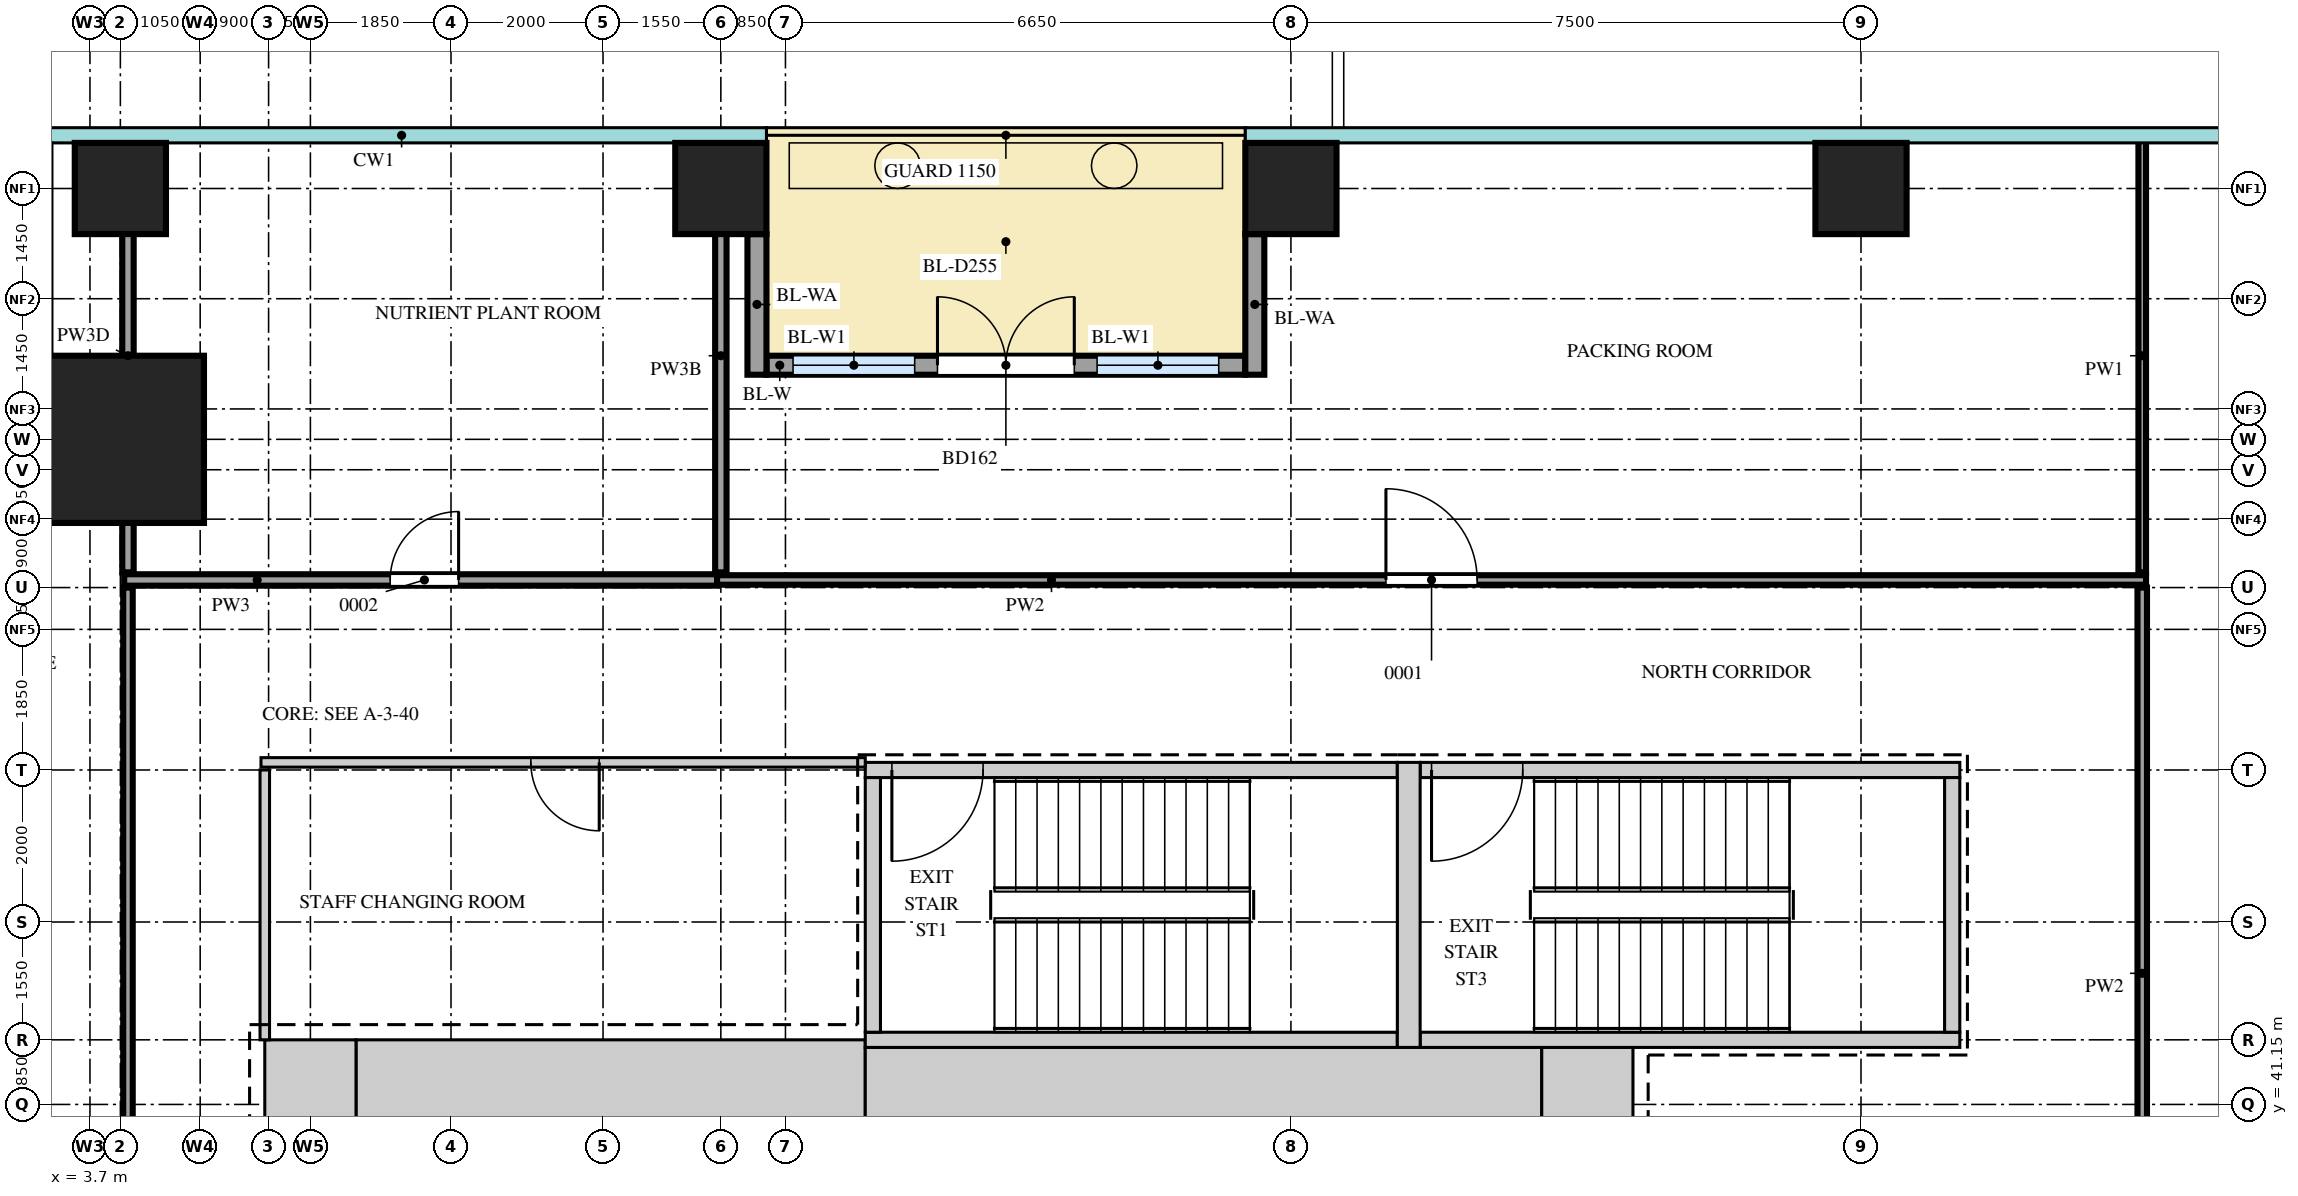
"""IFC4 building model, lengths in metres.
Left out: names, types, materials, properties, quantities, classifications, styles, units other than length and angle.
Written with IfcOpenShell. Run it as: python <this file> out.ifc"""

import sys

from ifc_helpers import new_model, si_unit, direction, frame, frame_2d, origin, origin_2d, place, context, subcontext, project, spatial, rectangle, extrude, source, transform, mapped, element, fill, save


model = new_model("IFC4")
c1 = context("Model", 3, precision=1e-05, world=origin(), true_north=direction((0.0, 1.0)))
c2 = subcontext(c1, "Body", "Model", "MODEL_VIEW")
j1 = project(units=[si_unit("LENGTHUNIT", "METRE"), si_unit("PLANEANGLEUNIT", "RADIAN")], contexts=[c1])
p1 = place(None, origin())
s1 = spatial("IfcSite", under=j1, at=p1, CompositionType="ELEMENT")
p2 = place(p1, origin())
s2 = spatial("IfcBuilding", under=s1, at=p2, CompositionType="ELEMENT")
p3 = place(p2, frame((0.0, 0.0, 78.0)))
s3 = spatial("IfcBuildingStorey", under=s2, at=p3, CompositionType="ELEMENT", Elevation=78.0)
m1 = source(origin(), c2, "Body", "SweptSolid", [
    extrude(rectangle(XDim=6.7, YDim=1.2, at=frame_2d((3.35, 0.0))), origin(), (0.0, 0.0, 1.0), 4.2),
])
p4 = place(p3, frame((7.2, 41.4, 0.0), z_axis=(0.0, 0.0, 1.0), x_axis=(1.0, 0.0, 0.0)))
e1 = element("IfcWall", 1, at=p4, inside=s3, PredefinedType="SHEAR", context=c2, shape_type="MappedRepresentation", body=[
    mapped(m1, transform((0.0, 0.0, 0.0))),
])
m2 = source(origin(), c2, "Body", "SweptSolid", [
    extrude(rectangle(XDim=8.9, YDim=1.1, at=frame_2d((4.45, 0.0))), origin(), (0.0, 0.0, 1.0), 4.2),
])
p5 = place(p3, frame((13.9, 41.35, 0.0), z_axis=(0.0, 0.0, 1.0), x_axis=(1.0, 0.0, 0.0)))
e2 = element("IfcWall", 2, at=p5, inside=s3, PredefinedType="SHEAR", context=c2, shape_type="MappedRepresentation", body=[
    mapped(m2, transform((0.0, 0.0, 0.0))),
])
m3 = source(origin(), c2, "Body", "SweptSolid", [
    extrude(rectangle(XDim=1.2, YDim=1.1, at=frame_2d((0.6, 0.0))), origin(), (0.0, 0.0, 1.0), 4.2),
])
p6 = place(p3, frame((22.8, 41.35, 0.0), z_axis=(0.0, 0.0, 1.0), x_axis=(1.0, 0.0, 0.0)))
e3 = element("IfcWall", 3, at=p6, inside=s3, PredefinedType="SHEAR", context=c2, shape_type="MappedRepresentation", body=[
    mapped(m3, transform((0.0, 0.0, 0.0))),
])
m4 = source(origin(), c2, "Body", "SweptSolid", [
    extrude(rectangle(XDim=1.2, YDim=1.2, at=frame_2d((0.6, 0.0))), origin(), (0.0, 0.0, 1.0), 4.2),
])
p7 = place(p3, frame((6.0, 41.4, 0.0), z_axis=(0.0, 0.0, 1.0), x_axis=(1.0, 0.0, 0.0)))
e4 = element("IfcWall", 4, at=p7, inside=s3, PredefinedType="SHEAR", context=c2, shape_type="MappedRepresentation", body=[
    mapped(m4, transform((0.0, 0.0, 0.0))),
])
m5 = source(origin(), c2, "Body", "SweptSolid", [
    extrude(rectangle(XDim=7.0, YDim=0.2, at=frame_2d((3.5, 0.0))), origin(), (0.0, 0.0, 1.0), 4.2),
])
p8 = place(p3, frame((13.9, 45.55, 0.0), z_axis=(0.0, 0.0, 1.0), x_axis=(1.0, 0.0, 0.0)))
e5 = element("IfcWall", 5, at=p8, inside=s3, PredefinedType="SHEAR", context=c2, shape_type="MappedRepresentation", body=[
    mapped(m5, transform((0.0, 0.0, 0.0))),
])
m6 = source(origin(), c2, "Body", "SweptSolid", [
    extrude(rectangle(XDim=1.2, YDim=2.1, at=frame_2d((0.6, 1.05))), frame((0.0, 0.11, 0.0), z_axis=(0.0, -1.0, 0.0), x_axis=(1.0, 0.0, 0.0)), (0.0, 0.0, 1.0), 0.22),
])
p9 = place(p8, frame((0.35, 0.0, 0.0)))
e6 = element("IfcOpeningElement", 6, at=p9, cuts=e5, PredefinedType="OPENING", context=c2, shape_type="MappedRepresentation", body=[
    mapped(m6, transform((0.0, 0.0, 0.0))),
])
p10 = place(p3, frame((13.9, 42.0, 0.0), z_axis=(0.0, 0.0, 1.0), x_axis=(1.0, 0.0, 0.0)))
e7 = element("IfcWall", 7, at=p10, inside=s3, PredefinedType="SHEAR", context=c2, shape_type="MappedRepresentation", body=[
    mapped(m5, transform((0.0, 0.0, 0.0))),
])
m7 = source(origin(), c2, "Body", "SweptSolid", [
    extrude(rectangle(XDim=7.1, YDim=0.2, at=frame_2d((3.55, 0.0))), origin(), (0.0, 0.0, 1.0), 4.2),
])
p11 = place(p3, frame((21.2, 45.55, 0.0), z_axis=(0.0, 0.0, 1.0), x_axis=(1.0, 0.0, 0.0)))
e8 = element("IfcWall", 8, at=p11, inside=s3, PredefinedType="SHEAR", context=c2, shape_type="MappedRepresentation", body=[
    mapped(m7, transform((0.0, 0.0, 0.0))),
])
p12 = place(p11, frame((0.15, 0.0, 0.0)))
e9 = element("IfcOpeningElement", 9, at=p12, cuts=e8, PredefinedType="OPENING", context=c2, shape_type="MappedRepresentation", body=[
    mapped(m6, transform((0.0, 0.0, 0.0))),
])
p13 = place(p3, frame((21.2, 42.0, 0.0), z_axis=(0.0, 0.0, 1.0), x_axis=(1.0, 0.0, 0.0)))
e10 = element("IfcWall", 10, at=p13, inside=s3, PredefinedType="SHEAR", context=c2, shape_type="MappedRepresentation", body=[
    mapped(m7, transform((0.0, 0.0, 0.0))),
])
m8 = source(origin(), c2, "Body", "SweptSolid", [
    extrude(rectangle(XDim=3.75, YDim=0.3, at=frame_2d((1.875, 0.0))), origin(), (0.0, 0.0, 1.0), 4.2),
])
p14 = place(p3, frame((21.05, 41.9, 0.0), z_axis=(0.0, 0.0, 1.0), x_axis=(0.0, 1.0, 0.0)))
e11 = element("IfcWall", 11, at=p14, inside=s3, PredefinedType="SHEAR", context=c2, shape_type="MappedRepresentation", body=[
    mapped(m8, transform((0.0, 0.0, 0.0))),
])
m9 = source(origin(), c2, "Body", "SweptSolid", [
    extrude(rectangle(XDim=3.35, YDim=0.2, at=frame_2d((1.675, 0.0))), origin(), (0.0, 0.0, 1.0), 4.2),
])
for number, where, z_axis, x_axis in (
    (12, (14.0, 42.1, 0.0), (0.0, 0.0, 1.0), (0.0, 1.0, 0.0)),
    (13, (28.2, 42.1, 0.0), (0.0, 0.0, 1.0), (0.0, 1.0, 0.0)),
):
    element("IfcWall", number, at=place(p3, frame(where, z_axis=z_axis, x_axis=x_axis)), inside=s3, PredefinedType="SHEAR", context=c2, shape_type="MappedRepresentation", body=[
        mapped(m9, transform((0.0, 0.0, 0.0))),
    ])
m10 = source(origin(), c2, "Body", "SweptSolid", [
    extrude(rectangle(XDim=2.2, YDim=2.2, at=origin_2d()), origin(), (0.0, 0.0, 1.0), 4.5),
])
p15 = place(p3, frame((4.1, 49.9, 0.0), z_axis=(0.0, 0.0, 1.0), x_axis=(1.0, 0.0, 0.0)))
e14 = element("IfcColumn", 14, at=p15, inside=s3, PredefinedType="COLUMN", context=c2, shape_type="MappedRepresentation", body=[
    mapped(m10, transform((0.0, 0.0, 0.0))),
])
m11 = source(origin(), c2, "Body", "SweptSolid", [
    extrude(rectangle(XDim=1.2, YDim=1.2, at=origin_2d()), origin(), (0.0, 0.0, 1.0), 4.2),
])
for number, where, z_axis, x_axis in (
    (15, (4.1, 53.2, 0.0), (0.0, 0.0, 1.0), (1.0, 0.0, 0.0)),
    (16, (12.0, 53.2, 0.0), (0.0, 0.0, 1.0), (1.0, 0.0, 0.0)),
    (17, (19.5, 53.2, 0.0), (0.0, 0.0, 1.0), (1.0, 0.0, 0.0)),
    (18, (27.0, 53.2, 0.0), (0.0, 0.0, 1.0), (1.0, 0.0, 0.0)),
):
    element("IfcColumn", number, at=place(p3, frame(where, z_axis=z_axis, x_axis=x_axis)), inside=s3, PredefinedType="COLUMN", context=c2, shape_type="MappedRepresentation", body=[
        mapped(m11, transform((0.0, 0.0, 0.0))),
    ])
m12 = source(origin(), c2, "Body", "SweptSolid", [
    extrude(rectangle(XDim=6.3, YDim=0.25, at=frame_2d((3.15, 0.0))), origin(), (0.0, 0.0, 1.0), 4.2),
])
p16 = place(p3, frame((12.6, 50.875, 0.0), z_axis=(0.0, 0.0, 1.0), x_axis=(1.0, 0.0, 0.0)))
e19 = element("IfcWall", 19, at=p16, inside=s3, PredefinedType="SOLIDWALL", context=c2, shape_type="MappedRepresentation", body=[
    mapped(m12, transform((0.0, 0.0, 0.0))),
])
m13 = source(origin(), c2, "Body", "SweptSolid", [
    extrude(rectangle(XDim=1.6, YDim=2.4, at=frame_2d((0.8, 1.2))), frame((0.0, 0.135, 0.0), z_axis=(0.0, -1.0, 0.0), x_axis=(1.0, 0.0, 0.0)), (0.0, 0.0, 1.0), 0.27),
])
p17 = place(p16, frame((0.35, 0.0, 0.0)))
e20 = element("IfcOpeningElement", 20, at=p17, cuts=e19, PredefinedType="OPENING", context=c2, shape_type="MappedRepresentation", body=[
    mapped(m13, transform((0.0, 0.0, 0.0))),
])
p18 = place(p16, frame((4.35, 0.0, 0.0)))
e21 = element("IfcOpeningElement", 21, at=p18, cuts=e19, PredefinedType="OPENING", context=c2, shape_type="MappedRepresentation", body=[
    mapped(m13, transform((0.0, 0.0, 0.0))),
])
m14 = source(origin(), c2, "Body", "SweptSolid", [
    extrude(rectangle(XDim=1.8, YDim=2.4, at=frame_2d((0.9, 1.2))), frame((0.0, 0.135, 0.0), z_axis=(0.0, -1.0, 0.0), x_axis=(1.0, 0.0, 0.0)), (0.0, 0.0, 1.0), 0.27),
])
p19 = place(p16, frame((2.25, 0.0, 0.0)))
e22 = element("IfcOpeningElement", 22, at=p19, cuts=e19, PredefinedType="OPENING", context=c2, shape_type="MappedRepresentation", body=[
    mapped(m14, transform((0.0, 0.0, 0.0))),
])
m15 = source(origin(), c2, "Body", "SweptSolid", [
    extrude(rectangle(XDim=1.85, YDim=0.25, at=frame_2d((0.925, 0.0))), origin(), (0.0, 0.0, 1.0), 3.9),
])
for number, where, z_axis, x_axis in (
    (23, (12.475, 52.6, 0.0), (0.0, 0.0, 1.0), (0.0, -1.0, 0.0)),
    (24, (19.025, 52.6, 0.0), (0.0, 0.0, 1.0), (0.0, -1.0, 0.0)),
):
    element("IfcWall", number, at=place(p3, frame(where, z_axis=z_axis, x_axis=x_axis)), inside=s3, PredefinedType="SOLIDWALL", context=c2, shape_type="MappedRepresentation", body=[
        mapped(m15, transform((0.0, 0.0, 0.0))),
    ])
m16 = source(origin(), c2, "Body", "SweptSolid", [
    extrude(rectangle(XDim=41.8, YDim=0.125, at=frame_2d((20.9, 0.0))), origin(), (0.0, 0.0, 1.0), 4.3),
])
p20 = place(p3, frame((4.2, 6.15, 0.0), z_axis=(0.0, 0.0, 1.0), x_axis=(0.0, 1.0, 0.0)))
e25 = element("IfcWall", 25, at=p20, inside=s3, PredefinedType="PARTITIONING", context=c2, shape_type="MappedRepresentation", body=[
    mapped(m16, transform((0.0, 0.0, 0.0))),
])
m17 = source(origin(), c2, "Body", "SweptSolid", [
    extrude(rectangle(XDim=1.2, YDim=2.1, at=frame_2d((0.6, 1.05))), frame((0.0, 0.073, 0.0), z_axis=(0.0, -1.0, 0.0), x_axis=(1.0, 0.0, 0.0)), (0.0, 0.0, 1.0), 0.145),
])
p21 = place(p20, frame((3.45, 0.0, 0.0)))
e26 = element("IfcOpeningElement", 26, at=p21, cuts=e25, PredefinedType="OPENING", context=c2, shape_type="MappedRepresentation", body=[
    mapped(m17, transform((0.0, 0.0, 0.0))),
])
m18 = source(origin(), c2, "Body", "SweptSolid", [
    extrude(rectangle(XDim=0.9, YDim=2.1, at=frame_2d((0.45, 1.05))), frame((0.0, 0.073, 0.0), z_axis=(0.0, -1.0, 0.0), x_axis=(1.0, 0.0, 0.0)), (0.0, 0.0, 1.0), 0.145),
])
p22 = place(p20, frame((13.25, 0.0, 0.0)))
e27 = element("IfcOpeningElement", 27, at=p22, cuts=e25, PredefinedType="OPENING", context=c2, shape_type="MappedRepresentation", body=[
    mapped(m18, transform((0.0, 0.0, 0.0))),
])
p23 = place(p20, frame((30.35, 0.0, 0.0)))
e28 = element("IfcOpeningElement", 28, at=p23, cuts=e25, PredefinedType="OPENING", context=c2, shape_type="MappedRepresentation", body=[
    mapped(m18, transform((0.0, 0.0, 0.0))),
])
m19 = source(origin(), c2, "Body", "SweptSolid", [
    extrude(rectangle(XDim=10.15, YDim=0.125, at=frame_2d((5.075, 0.0))), origin(), (0.0, 0.0, 1.0), 4.3),
])
p24 = place(p3, frame((30.7, 37.8, 0.0), z_axis=(0.0, 0.0, 1.0), x_axis=(0.0, 1.0, 0.0)))
e29 = element("IfcWall", 29, at=p24, inside=s3, PredefinedType="PARTITIONING", context=c2, shape_type="MappedRepresentation", body=[
    mapped(m19, transform((0.0, 0.0, 0.0))),
])
m20 = source(origin(), c2, "Body", "SweptSolid", [
    extrude(rectangle(XDim=3.55, YDim=0.125, at=frame_2d((1.775, 0.0))), origin(), (0.0, 0.0, 1.0), 4.3),
])
p25 = place(p3, frame((6.0, 42.0, 0.0), z_axis=(0.0, 0.0, 1.0), x_axis=(0.0, 1.0, 0.0)))
e30 = element("IfcWall", 30, at=p25, inside=s3, PredefinedType="PARTITIONING", context=c2, shape_type="MappedRepresentation", body=[
    mapped(m20, transform((0.0, 0.0, 0.0))),
])
m21 = source(origin(), c2, "Body", "SweptSolid", [
    extrude(rectangle(XDim=7.95, YDim=0.125, at=frame_2d((3.975, 0.0))), origin(), (0.0, 0.0, 1.0), 4.3),
])
p26 = place(p3, frame((5.95, 45.65, 0.0), z_axis=(0.0, 0.0, 1.0), x_axis=(1.0, 0.0, 0.0)))
e31 = element("IfcWall", 31, at=p26, inside=s3, PredefinedType="PARTITIONING", context=c2, shape_type="MappedRepresentation", body=[
    mapped(m21, transform((0.0, 0.0, 0.0))),
])
p27 = place(p26, frame((3.55, 0.0, 0.0)))
e32 = element("IfcOpeningElement", 32, at=p27, cuts=e31, PredefinedType="OPENING", context=c2, shape_type="MappedRepresentation", body=[
    mapped(m18, transform((0.0, 0.0, 0.0))),
])
m22 = source(origin(), c2, "Body", "SweptSolid", [
    extrude(rectangle(XDim=7.8, YDim=0.15, at=frame_2d((3.9, 0.0))), origin(), (0.0, 0.0, 1.0), 4.3),
])
p28 = place(p3, frame((4.15, 48.05, 0.0), z_axis=(0.0, 0.0, 1.0), x_axis=(1.0, 0.0, 0.0)))
e33 = element("IfcWall", 33, at=p28, inside=s3, PredefinedType="PARTITIONING", context=c2, shape_type="MappedRepresentation", body=[
    mapped(m22, transform((0.0, 0.0, 0.0))),
])
m23 = source(origin(), c2, "Body", "SweptSolid", [
    extrude(rectangle(XDim=0.9, YDim=2.1, at=frame_2d((0.45, 1.05))), frame((0.0, 0.085, 0.0), z_axis=(0.0, -1.0, 0.0), x_axis=(1.0, 0.0, 0.0)), (0.0, 0.0, 1.0), 0.17),
])
p29 = place(p28, frame((3.5, 0.0, 0.0)))
e34 = element("IfcOpeningElement", 34, at=p29, cuts=e33, PredefinedType="OPENING", context=c2, shape_type="MappedRepresentation", body=[
    mapped(m23, transform((0.0, 0.0, 0.0))),
])
m24 = source(origin(), c2, "Body", "SweptSolid", [
    extrude(rectangle(XDim=18.8, YDim=0.125, at=frame_2d((9.4, 0.0))), origin(), (0.0, 0.0, 1.0), 4.3),
])
p30 = place(p3, frame((11.95, 48.05, 0.0), z_axis=(0.0, 0.0, 1.0), x_axis=(1.0, 0.0, 0.0)))
e35 = element("IfcWall", 35, at=p30, inside=s3, PredefinedType="PARTITIONING", context=c2, shape_type="MappedRepresentation", body=[
    mapped(m24, transform((0.0, 0.0, 0.0))),
])
p31 = place(p30, frame((8.8, 0.0, 0.0)))
e36 = element("IfcOpeningElement", 36, at=p31, cuts=e35, PredefinedType="OPENING", context=c2, shape_type="MappedRepresentation", body=[
    mapped(m17, transform((0.0, 0.0, 0.0))),
])
m25 = source(origin(), c2, "Body", "SweptSolid", [
    extrude(rectangle(XDim=5.7, YDim=0.15, at=frame_2d((2.85, 0.0))), origin(), (0.0, 0.0, 1.0), 3.6),
])
p32 = place(p3, frame((4.2, 48.15, 0.0), z_axis=(0.0, 0.0, 1.0), x_axis=(0.0, 1.0, 0.0)))
e37 = element("IfcWall", 37, at=p32, inside=s3, PredefinedType="PARTITIONING", context=c2, shape_type="MappedRepresentation", body=[
    mapped(m25, transform((0.0, 0.0, 0.0))),
])
m26 = source(origin(), c2, "Body", "SweptSolid", [
    extrude(rectangle(XDim=5.7, YDim=0.15, at=frame_2d((2.85, 0.0))), origin(), (0.0, 0.0, 1.0), 3.7),
])
p33 = place(p3, frame((12.0, 48.15, 0.0), z_axis=(0.0, 0.0, 1.0), x_axis=(0.0, 1.0, 0.0)))
e38 = element("IfcWall", 38, at=p33, inside=s3, PredefinedType="PARTITIONING", context=c2, shape_type="MappedRepresentation", body=[
    mapped(m26, transform((0.0, 0.0, 0.0))),
])
m27 = source(origin(), c2, "Body", "SweptSolid", [
    extrude(rectangle(XDim=5.7, YDim=0.1, at=frame_2d((2.85, 0.0))), origin(), (0.0, 0.0, 1.0), 4.3),
])
p34 = place(p3, frame((30.7, 48.15, 0.0), z_axis=(0.0, 0.0, 1.0), x_axis=(0.0, 1.0, 0.0)))
e39 = element("IfcWall", 39, at=p34, inside=s3, PredefinedType="PARTITIONING", context=c2, shape_type="MappedRepresentation", body=[
    mapped(m27, transform((0.0, 0.0, 0.0))),
])
m28 = source(origin(), c2, "Body", "SweptSolid", [
    extrude(rectangle(XDim=1.6, YDim=2.4, at=frame_2d((0.8, 1.2))), frame((0.0, 0.03, 0.0), z_axis=(0.0, -1.0, 0.0), x_axis=(1.0, 0.0, 0.0)), (0.0, 0.0, 1.0), 0.06),
])
p35 = place(p17, origin())
e40 = element("IfcWindow", 40, at=p35, inside=s3, PartitioningType="SINGLE_PANEL", PredefinedType="WINDOW", context=c2, shape_type="MappedRepresentation", body=[
    mapped(m28, transform((0.0, 0.0, 0.0))),
])
fill(e20, e40)
p36 = place(p18, origin())
e41 = element("IfcWindow", 41, at=p36, inside=s3, PartitioningType="SINGLE_PANEL", PredefinedType="WINDOW", context=c2, shape_type="MappedRepresentation", body=[
    mapped(m28, transform((0.0, 0.0, 0.0))),
])
fill(e21, e41)
m29 = source(origin(), c2, "Body", "SweptSolid", [
    extrude(rectangle(XDim=1.8, YDim=2.4, at=frame_2d((0.9, 1.2))), frame((0.0, 0.025, 0.0), z_axis=(0.0, -1.0, 0.0), x_axis=(1.0, 0.0, 0.0)), (0.0, 0.0, 1.0), 0.05),
])
p37 = place(p19, origin())
e42 = element("IfcDoor", 42, at=p37, inside=s3, OperationType="DOUBLE_DOOR_DOUBLE_SWING", PredefinedType="DOOR", context=c2, shape_type="MappedRepresentation", body=[
    mapped(m29, transform((0.0, 0.0, 0.0))),
])
fill(e22, e42)
m30 = source(origin(), c2, "Body", "SweptSolid", [
    extrude(rectangle(XDim=0.9, YDim=2.1, at=frame_2d((0.45, 1.05))), frame((0.0, 0.025, 0.0), z_axis=(0.0, -1.0, 0.0), x_axis=(1.0, 0.0, 0.0)), (0.0, 0.0, 1.0), 0.05),
])
p38 = place(p29, origin())
e43 = element("IfcDoor", 43, at=p38, inside=s3, OperationType="SINGLE_SWING_LEFT", PredefinedType="DOOR", context=c2, shape_type="MappedRepresentation", body=[
    mapped(m30, transform((0.0, 0.0, 0.0))),
])
fill(e34, e43)
m31 = source(origin(), c2, "Body", "SweptSolid", [
    extrude(rectangle(XDim=1.2, YDim=2.1, at=frame_2d((0.6, 1.05))), frame((0.0, 0.025, 0.0), z_axis=(0.0, -1.0, 0.0), x_axis=(1.0, 0.0, 0.0)), (0.0, 0.0, 1.0), 0.05),
])
p39 = place(p31, origin())
e44 = element("IfcDoor", 44, at=p39, inside=s3, OperationType="SINGLE_SWING_RIGHT", PredefinedType="DOOR", context=c2, shape_type="MappedRepresentation", body=[
    mapped(m31, transform((0.0, 0.0, 0.0))),
])
fill(e36, e44)
p40 = place(p27, origin())
e45 = element("IfcDoor", 45, at=p40, inside=s3, OperationType="SINGLE_SWING_RIGHT", PredefinedType="DOOR", context=c2, shape_type="MappedRepresentation", body=[
    mapped(m30, transform((0.0, 0.0, 0.0))),
])
fill(e32, e45)
p41 = place(p9, origin())
e46 = element("IfcDoor", 46, at=p41, inside=s3, OperationType="SINGLE_SWING_LEFT", PredefinedType="DOOR", context=c2, shape_type="MappedRepresentation", body=[
    mapped(m31, transform((0.0, 0.0, 0.0))),
])
fill(e6, e46)
p42 = place(p12, origin())
e47 = element("IfcDoor", 47, at=p42, inside=s3, OperationType="SINGLE_SWING_LEFT", PredefinedType="DOOR", context=c2, shape_type="MappedRepresentation", body=[
    mapped(m31, transform((0.0, 0.0, 0.0))),
])
fill(e9, e47)
save(model, sys.argv[1])
